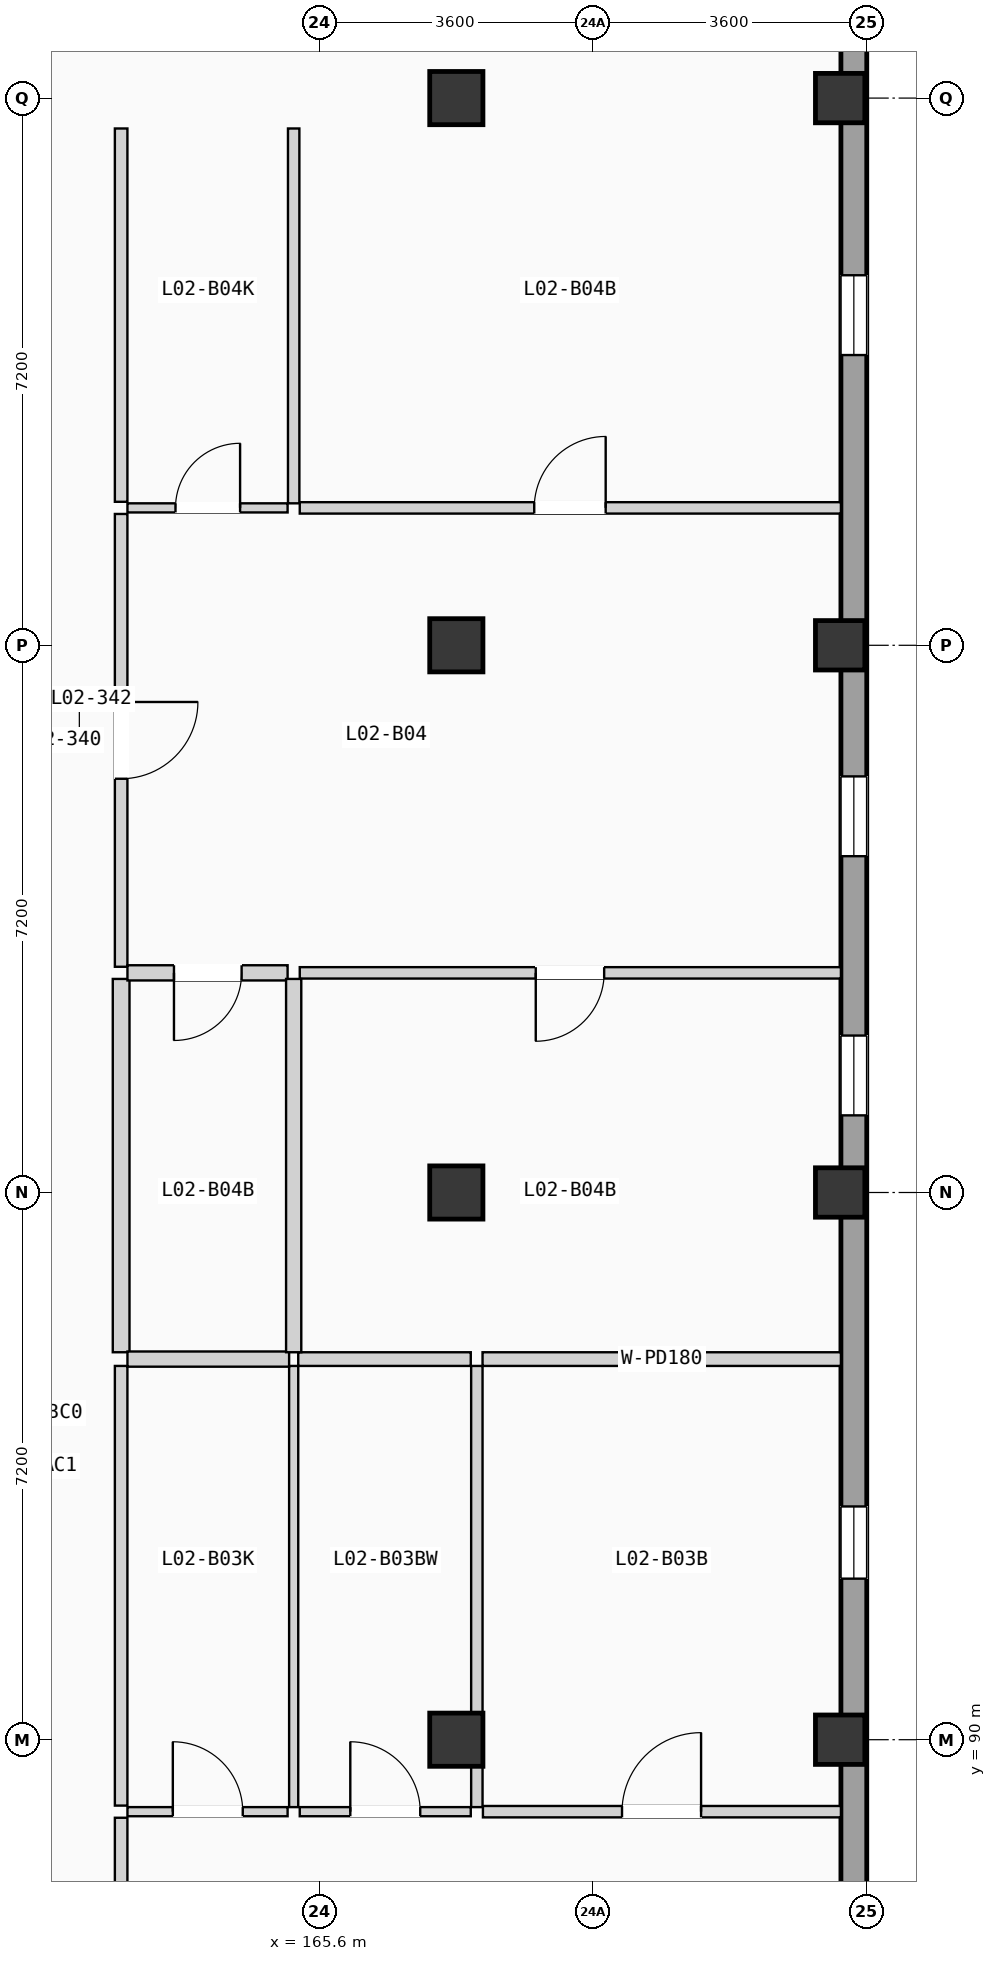
"""IFC4 building model, lengths in metres.
Left out: names, types, materials, properties, quantities, classifications, styles, units other than length and angle.
Written with IfcOpenShell. Run it as: python <this file> out.ifc"""

import sys

from ifc_helpers import new_model, si_unit, direction, frame, frame_2d, origin, origin_2d, place, context, subcontext, project, spatial, rectangle, extrude, element, fill, save


model = new_model("IFC4")
c1 = context("Model", 3, precision=1e-05, world=origin(), true_north=direction((0.0, 1.0)))
c2 = subcontext(c1, "Body", "Model", "MODEL_VIEW")
j1 = project(units=[si_unit("LENGTHUNIT", "METRE"), si_unit("PLANEANGLEUNIT", "RADIAN")], contexts=[c1])
p1 = place(None, origin())
s1 = spatial("IfcSite", under=j1, at=p1, CompositionType="ELEMENT")
p2 = place(p1, origin())
s2 = spatial("IfcBuilding", under=s1, at=p2, CompositionType="ELEMENT")
p3 = place(p2, frame((0.0, 0.0, 8.575)))
s3 = spatial("IfcBuildingStorey", under=s2, at=p3, CompositionType="ELEMENT", Elevation=8.575)
for number, where, z_axis, x_axis in (
    (1, (167.4, 90.0, 0.0), (0.0, 0.0, 1.0), (1.0, 0.0, 0.0)),
    (2, (167.4, 97.2, 0.0), (0.0, 0.0, 1.0), (1.0, 0.0, 0.0)),
    (3, (167.4, 104.4, 0.0), (0.0, 0.0, 1.0), (1.0, 0.0, 0.0)),
    (4, (167.4, 111.6, 0.0), (0.0, 0.0, 1.0), (1.0, 0.0, 0.0)),
):
    element("IfcColumn", number, at=place(p3, frame(where, z_axis=z_axis, x_axis=x_axis)), inside=s3, PredefinedType="COLUMN", context=c2, shape_type="SweptSolid", body=[
        extrude(rectangle(XDim=0.7, YDim=0.7, at=origin_2d()), origin(), (0.0, 0.0, 1.0), 3.5),
    ])
for number, where, z_axis, x_axis in (
    (5, (172.45, 90.0, 0.0), (0.0, 0.0, 1.0), (1.0, 0.0, 0.0)),
    (6, (172.45, 97.2, 0.0), (0.0, 0.0, 1.0), (1.0, 0.0, 0.0)),
    (7, (172.45, 104.4, 0.0), (0.0, 0.0, 1.0), (1.0, 0.0, 0.0)),
    (8, (172.45, 111.6, 0.0), (0.0, 0.0, 1.0), (1.0, 0.0, 0.0)),
):
    element("IfcColumn", number, at=place(p3, frame(where, z_axis=z_axis, x_axis=x_axis)), inside=s3, PredefinedType="COLUMN", context=c2, shape_type="SweptSolid", body=[
        extrude(rectangle(XDim=0.65, YDim=0.65, at=origin_2d()), origin(), (0.0, 0.0, 1.0), 3.5),
    ])
p4 = place(p3, frame((172.63, 68.74, 0.0), z_axis=(0.0, 0.0, 1.0), x_axis=(0.0, 1.0, 0.0)))
e9 = element("IfcWall", 9, at=p4, inside=s3, PredefinedType="SOLIDWALL", context=c2, shape_type="SweptSolid", body=[
    extrude(rectangle(XDim=49.72, YDim=0.34, at=frame_2d((24.86, 0.0))), origin(), (0.0, 0.0, 1.0), 3.24),
])
p5 = place(p4, frame((16.807, 0.0, 0.9)))
e10 = element("IfcOpeningElement", 10, at=p5, cuts=e9, PredefinedType="OPENING", context=c2, shape_type="SweptSolid", body=[
    extrude(rectangle(XDim=0.95, YDim=1.5, at=frame_2d((0.475, 0.75))), frame((0.0, 0.18, 0.0), z_axis=(0.0, -1.0, 0.0), x_axis=(1.0, 0.0, 0.0)), (0.0, 0.0, 1.0), 0.36),
])
p6 = place(p4, frame((9.678, 0.0, 0.9)))
e11 = element("IfcOpeningElement", 11, at=p6, cuts=e9, PredefinedType="OPENING", context=c2, shape_type="SweptSolid", body=[
    extrude(rectangle(XDim=0.95, YDim=1.65, at=frame_2d((0.475, 0.825))), frame((0.0, 0.18, 0.0), z_axis=(0.0, -1.0, 0.0), x_axis=(1.0, 0.0, 0.0)), (0.0, 0.0, 1.0), 0.36),
])
p7 = place(p4, frame((23.379, 0.0, 0.755)))
e12 = element("IfcOpeningElement", 12, at=p7, cuts=e9, PredefinedType="OPENING", context=c2, shape_type="SweptSolid", body=[
    extrude(rectangle(XDim=0.95, YDim=1.8, at=frame_2d((0.475, 0.9))), frame((0.0, 0.18, 0.0), z_axis=(0.0, -1.0, 0.0), x_axis=(1.0, 0.0, 0.0)), (0.0, 0.0, 1.0), 0.36),
])
p8 = place(p4, frame((32.885, 0.0, 0.9)))
e13 = element("IfcOpeningElement", 13, at=p8, cuts=e9, PredefinedType="OPENING", context=c2, shape_type="SweptSolid", body=[
    extrude(rectangle(XDim=1.05, YDim=1.2, at=frame_2d((0.525, 0.6))), frame((0.0, 0.18, 0.0), z_axis=(0.0, -1.0, 0.0), x_axis=(1.0, 0.0, 0.0)), (0.0, 0.0, 1.0), 0.36),
])
p9 = place(p4, frame((29.475, 0.0, 0.9)))
e14 = element("IfcOpeningElement", 14, at=p9, cuts=e9, PredefinedType="OPENING", context=c2, shape_type="SweptSolid", body=[
    extrude(rectangle(XDim=1.05, YDim=1.35, at=frame_2d((0.525, 0.675))), frame((0.0, 0.18, 0.0), z_axis=(0.0, -1.0, 0.0), x_axis=(1.0, 0.0, 0.0)), (0.0, 0.0, 1.0), 0.36),
])
p10 = place(p4, frame((39.479, 0.0, 0.9)))
e15 = element("IfcOpeningElement", 15, at=p10, cuts=e9, PredefinedType="OPENING", context=c2, shape_type="SweptSolid", body=[
    extrude(rectangle(XDim=1.05, YDim=1.5, at=frame_2d((0.525, 0.75))), frame((0.0, 0.18, 0.0), z_axis=(0.0, -1.0, 0.0), x_axis=(1.0, 0.0, 0.0)), (0.0, 0.0, 1.0), 0.36),
])
p11 = place(p3, frame((162.99, 81.945, 0.0), z_axis=(0.0, 0.0, 1.0), x_axis=(0.0, 1.0, 0.0)))
e16 = element("IfcWall", 16, at=p11, inside=s3, PredefinedType="PARTITIONING", context=c2, shape_type="SweptSolid", body=[
    extrude(rectangle(XDim=7.028, YDim=0.165, at=frame_2d((3.514, 0.0))), origin(), (0.0, 0.0, 1.0), 3.22),
])
p12 = place(p11, frame((3.009, 0.0, 0.0)))
e17 = element("IfcOpeningElement", 17, at=p12, cuts=e16, PredefinedType="OPENING", context=c2, shape_type="SweptSolid", body=[
    extrude(rectangle(XDim=1.01, YDim=2.11, at=frame_2d((0.505, 1.055))), frame((0.0, 0.093, 0.0), z_axis=(0.0, -1.0, 0.0), x_axis=(1.0, 0.0, 0.0)), (0.0, 0.0, 1.0), 0.185),
])
p13 = place(p3, frame((162.99, 89.133, 0.0), z_axis=(0.0, 0.0, 1.0), x_axis=(0.0, 1.0, 0.0)))
e18 = element("IfcWall", 18, at=p13, inside=s3, PredefinedType="PARTITIONING", context=c2, shape_type="SweptSolid", body=[
    extrude(rectangle(XDim=5.785, YDim=0.165, at=frame_2d((2.893, 0.0))), origin(), (0.0, 0.0, 1.0), 3.22),
])
p14 = place(p3, frame((162.99, 100.17, 0.0), z_axis=(0.0, 0.0, 1.0), x_axis=(0.0, 1.0, 0.0)))
e19 = element("IfcWall", 19, at=p14, inside=s3, PredefinedType="PARTITIONING", context=c2, shape_type="SweptSolid", body=[
    extrude(rectangle(XDim=5.958, YDim=0.165, at=frame_2d((2.979, 0.0))), origin(), (0.0, 0.0, 1.0), 3.22),
])
p15 = place(p14, frame((2.474, 0.0, 0.0)))
e20 = element("IfcOpeningElement", 20, at=p15, cuts=e19, PredefinedType="OPENING", context=c2, shape_type="SweptSolid", body=[
    extrude(rectangle(XDim=1.01, YDim=2.11, at=frame_2d((0.505, 1.055))), frame((0.0, 0.093, 0.0), z_axis=(0.0, -1.0, 0.0), x_axis=(1.0, 0.0, 0.0)), (0.0, 0.0, 1.0), 0.185),
])
p16 = place(p3, frame((162.99, 95.098, 0.0), z_axis=(0.0, 0.0, 1.0), x_axis=(0.0, 1.0, 0.0)))
e21 = element("IfcWall", 21, at=p16, inside=s3, PredefinedType="PLUMBINGWALL", context=c2, shape_type="SweptSolid", body=[
    extrude(rectangle(XDim=4.912, YDim=0.22, at=frame_2d((2.456, 0.0))), origin(), (0.0, 0.0, 1.0), 3.22),
])
p17 = place(p3, frame((162.99, 106.288, 0.0), z_axis=(0.0, 0.0, 1.0), x_axis=(0.0, 1.0, 0.0)))
e22 = element("IfcWall", 22, at=p17, inside=s3, PredefinedType="PARTITIONING", context=c2, shape_type="SweptSolid", body=[
    extrude(rectangle(XDim=4.912, YDim=0.165, at=frame_2d((2.456, 0.0))), origin(), (0.0, 0.0, 1.0), 3.22),
])
p18 = place(p3, frame((163.073, 89.053, 0.0), z_axis=(0.0, 0.0, 1.0), x_axis=(1.0, 0.0, 0.0)))
e23 = element("IfcWall", 23, at=p18, inside=s3, PredefinedType="PARTITIONING", context=c2, shape_type="SweptSolid", body=[
    extrude(rectangle(XDim=2.107, YDim=0.12, at=frame_2d((1.053, 0.0))), origin(), (0.0, 0.0, 1.0), 3.22),
])
p19 = place(p18, frame((0.597, 0.0, 0.0)))
e24 = element("IfcOpeningElement", 24, at=p19, cuts=e23, PredefinedType="OPENING", context=c2, shape_type="SweptSolid", body=[
    extrude(rectangle(XDim=0.92, YDim=2.02, at=frame_2d((0.46, 1.01))), frame((0.0, 0.07, 0.0), z_axis=(0.0, -1.0, 0.0), x_axis=(1.0, 0.0, 0.0)), (0.0, 0.0, 1.0), 0.14),
])
p20 = place(p3, frame((167.75, 89.053, 0.0), z_axis=(0.0, 0.0, 1.0), x_axis=(1.0, 0.0, 0.0)))
e25 = element("IfcWall", 25, at=p20, inside=s3, PredefinedType="PARTITIONING", context=c2, shape_type="SweptSolid", body=[
    extrude(rectangle(XDim=4.71, YDim=0.15, at=frame_2d((2.355, 0.0))), origin(), (0.0, 0.0, 1.0), 3.22),
])
p21 = place(p20, frame((1.83, 0.0, 0.0)))
e26 = element("IfcOpeningElement", 26, at=p21, cuts=e25, PredefinedType="OPENING", context=c2, shape_type="SweptSolid", body=[
    extrude(rectangle(XDim=1.04, YDim=2.08, at=frame_2d((0.52, 1.04))), frame((0.0, 0.085, 0.0), z_axis=(0.0, -1.0, 0.0), x_axis=(1.0, 0.0, 0.0)), (0.0, 0.0, 1.0), 0.17),
])
p22 = place(p3, frame((165.34, 89.053, 0.0), z_axis=(0.0, 0.0, 1.0), x_axis=(1.0, 0.0, 0.0)))
e27 = element("IfcWall", 27, at=p22, inside=s3, PredefinedType="PARTITIONING", context=c2, shape_type="SweptSolid", body=[
    extrude(rectangle(XDim=2.25, YDim=0.12, at=frame_2d((1.125, 0.0))), origin(), (0.0, 0.0, 1.0), 3.22),
])
p23 = place(p22, frame((0.665, 0.0, 0.0)))
e28 = element("IfcOpeningElement", 28, at=p23, cuts=e27, PredefinedType="OPENING", context=c2, shape_type="SweptSolid", body=[
    extrude(rectangle(XDim=0.92, YDim=2.02, at=frame_2d((0.46, 1.01))), frame((0.0, 0.07, 0.0), z_axis=(0.0, -1.0, 0.0), x_axis=(1.0, 0.0, 0.0)), (0.0, 0.0, 1.0), 0.14),
])
p24 = place(p3, frame((165.26, 89.113, 0.0), z_axis=(0.0, 0.0, 1.0), x_axis=(0.0, 1.0, 0.0)))
e29 = element("IfcWall", 29, at=p24, inside=s3, PredefinedType="PARTITIONING", context=c2, shape_type="SweptSolid", body=[
    extrude(rectangle(XDim=5.805, YDim=0.12, at=frame_2d((2.902, 0.0))), origin(), (0.0, 0.0, 1.0), 3.22),
])
p25 = place(p3, frame((163.073, 95.008, 0.0), z_axis=(0.0, 0.0, 1.0), x_axis=(1.0, 0.0, 0.0)))
e30 = element("IfcWall", 30, at=p25, inside=s3, PredefinedType="PLUMBINGWALL", context=c2, shape_type="SweptSolid", body=[
    extrude(rectangle(XDim=2.127, YDim=0.2, at=frame_2d((1.063, 0.0))), origin(), (0.0, 0.0, 1.0), 3.22),
])
p26 = place(p3, frame((167.67, 89.113, 0.0), z_axis=(0.0, 0.0, 1.0), x_axis=(0.0, 1.0, 0.0)))
e31 = element("IfcWall", 31, at=p26, inside=s3, PredefinedType="PARTITIONING", context=c2, shape_type="SweptSolid", body=[
    extrude(rectangle(XDim=5.805, YDim=0.15, at=frame_2d((2.902, 0.0))), origin(), (0.0, 0.0, 1.0), 3.22),
])
p27 = place(p3, frame((167.745, 95.008, 0.0), z_axis=(0.0, 0.0, 1.0), x_axis=(1.0, 0.0, 0.0)))
e32 = element("IfcWall", 32, at=p27, inside=s3, PredefinedType="PARTITIONING", context=c2, shape_type="SweptSolid", body=[
    extrude(rectangle(XDim=4.715, YDim=0.18, at=frame_2d((2.357, 0.0))), origin(), (0.0, 0.0, 1.0), 3.22),
])
p28 = place(p3, frame((165.32, 95.008, 0.0), z_axis=(0.0, 0.0, 1.0), x_axis=(1.0, 0.0, 0.0)))
e33 = element("IfcWall", 33, at=p28, inside=s3, PredefinedType="PARTITIONING", context=c2, shape_type="SweptSolid", body=[
    extrude(rectangle(XDim=2.27, YDim=0.18, at=frame_2d((1.135, 0.0))), origin(), (0.0, 0.0, 1.0), 3.22),
])
p29 = place(p3, frame((163.073, 100.09, 0.0), z_axis=(0.0, 0.0, 1.0), x_axis=(1.0, 0.0, 0.0)))
e34 = element("IfcWall", 34, at=p29, inside=s3, PredefinedType="PLUMBINGWALL", context=c2, shape_type="SweptSolid", body=[
    extrude(rectangle(XDim=2.107, YDim=0.2, at=frame_2d((1.053, 0.0))), origin(), (0.0, 0.0, 1.0), 3.22),
])
p30 = place(p29, frame((0.612, 0.0, 0.0)))
e35 = element("IfcOpeningElement", 35, at=p30, cuts=e34, PredefinedType="OPENING", context=c2, shape_type="SweptSolid", body=[
    extrude(rectangle(XDim=0.89, YDim=2.03, at=frame_2d((0.445, 1.015))), frame((0.0, 0.11, 0.0), z_axis=(0.0, -1.0, 0.0), x_axis=(1.0, 0.0, 0.0)), (0.0, 0.0, 1.0), 0.22),
])
p31 = place(p3, frame((163.073, 106.208, 0.0), z_axis=(0.0, 0.0, 1.0), x_axis=(1.0, 0.0, 0.0)))
e36 = element("IfcWall", 36, at=p31, inside=s3, PredefinedType="PARTITIONING", context=c2, shape_type="SweptSolid", body=[
    extrude(rectangle(XDim=2.107, YDim=0.12, at=frame_2d((1.053, 0.0))), origin(), (0.0, 0.0, 1.0), 3.22),
])
p32 = place(p31, frame((0.632, 0.0, 0.0)))
e37 = element("IfcOpeningElement", 37, at=p32, cuts=e36, PredefinedType="OPENING", context=c2, shape_type="SweptSolid", body=[
    extrude(rectangle(XDim=0.85, YDim=2.01, at=frame_2d((0.425, 1.005))), frame((0.0, 0.07, 0.0), z_axis=(0.0, -1.0, 0.0), x_axis=(1.0, 0.0, 0.0)), (0.0, 0.0, 1.0), 0.14),
])
p33 = place(p3, frame((165.34, 100.09, 0.0), z_axis=(0.0, 0.0, 1.0), x_axis=(1.0, 0.0, 0.0)))
e38 = element("IfcWall", 38, at=p33, inside=s3, PredefinedType="PARTITIONING", context=c2, shape_type="SweptSolid", body=[
    extrude(rectangle(XDim=7.12, YDim=0.15, at=frame_2d((3.56, 0.0))), origin(), (0.0, 0.0, 1.0), 3.22),
])
p34 = place(p33, frame((3.105, 0.0, 0.0)))
e39 = element("IfcOpeningElement", 39, at=p34, cuts=e38, PredefinedType="OPENING", context=c2, shape_type="SweptSolid", body=[
    extrude(rectangle(XDim=0.9, YDim=2.04, at=frame_2d((0.45, 1.02))), frame((0.0, 0.085, 0.0), z_axis=(0.0, -1.0, 0.0), x_axis=(1.0, 0.0, 0.0)), (0.0, 0.0, 1.0), 0.17),
])
p35 = place(p3, frame((165.34, 106.208, 0.0), z_axis=(0.0, 0.0, 1.0), x_axis=(1.0, 0.0, 0.0)))
e40 = element("IfcWall", 40, at=p35, inside=s3, PredefinedType="PARTITIONING", context=c2, shape_type="SweptSolid", body=[
    extrude(rectangle(XDim=7.12, YDim=0.15, at=frame_2d((3.56, 0.0))), origin(), (0.0, 0.0, 1.0), 3.22),
])
p36 = place(p35, frame((3.085, 0.0, 0.0)))
e41 = element("IfcOpeningElement", 41, at=p36, cuts=e40, PredefinedType="OPENING", context=c2, shape_type="SweptSolid", body=[
    extrude(rectangle(XDim=0.94, YDim=2.06, at=frame_2d((0.47, 1.03))), frame((0.0, 0.085, 0.0), z_axis=(0.0, -1.0, 0.0), x_axis=(1.0, 0.0, 0.0)), (0.0, 0.0, 1.0), 0.17),
])
p37 = place(p3, frame((165.26, 95.098, 0.0), z_axis=(0.0, 0.0, 1.0), x_axis=(0.0, 1.0, 0.0)))
e42 = element("IfcWall", 42, at=p37, inside=s3, PredefinedType="PLUMBINGWALL", context=c2, shape_type="SweptSolid", body=[
    extrude(rectangle(XDim=4.912, YDim=0.2, at=frame_2d((2.456, 0.0))), origin(), (0.0, 0.0, 1.0), 3.22),
])
p38 = place(p3, frame((165.26, 106.268, 0.0), z_axis=(0.0, 0.0, 1.0), x_axis=(0.0, 1.0, 0.0)))
e43 = element("IfcWall", 43, at=p38, inside=s3, PredefinedType="PARTITIONING", context=c2, shape_type="SweptSolid", body=[
    extrude(rectangle(XDim=4.932, YDim=0.15, at=frame_2d((2.466, 0.0))), origin(), (0.0, 0.0, 1.0), 3.22),
])
p39 = place(p7, origin())
e44 = element("IfcWindow", 44, at=p39, inside=s3, PartitioningType="SINGLE_PANEL", PredefinedType="WINDOW", context=c2, shape_type="SweptSolid", body=[
    extrude(rectangle(XDim=0.95, YDim=1.8, at=frame_2d((0.475, 0.9))), frame((0.0, 0.03, 0.0), z_axis=(0.0, -1.0, 0.0), x_axis=(1.0, 0.0, 0.0)), (0.0, 0.0, 1.0), 0.06),
])
fill(e12, e44)
p40 = place(p8, origin())
e45 = element("IfcWindow", 45, at=p40, inside=s3, PartitioningType="SINGLE_PANEL", PredefinedType="WINDOW", context=c2, shape_type="SweptSolid", body=[
    extrude(rectangle(XDim=1.05, YDim=1.2, at=frame_2d((0.525, 0.6))), frame((0.0, 0.03, 0.0), z_axis=(0.0, -1.0, 0.0), x_axis=(1.0, 0.0, 0.0)), (0.0, 0.0, 1.0), 0.06),
])
fill(e13, e45)
p41 = place(p9, origin())
e46 = element("IfcWindow", 46, at=p41, inside=s3, PartitioningType="SINGLE_PANEL", PredefinedType="WINDOW", context=c2, shape_type="SweptSolid", body=[
    extrude(rectangle(XDim=1.05, YDim=1.35, at=frame_2d((0.525, 0.675))), frame((0.0, 0.03, 0.0), z_axis=(0.0, -1.0, 0.0), x_axis=(1.0, 0.0, 0.0)), (0.0, 0.0, 1.0), 0.06),
])
fill(e14, e46)
p42 = place(p10, origin())
e47 = element("IfcWindow", 47, at=p42, inside=s3, PartitioningType="SINGLE_PANEL", PredefinedType="WINDOW", context=c2, shape_type="SweptSolid", body=[
    extrude(rectangle(XDim=1.05, YDim=1.5, at=frame_2d((0.525, 0.75))), frame((0.0, 0.03, 0.0), z_axis=(0.0, -1.0, 0.0), x_axis=(1.0, 0.0, 0.0)), (0.0, 0.0, 1.0), 0.06),
])
fill(e15, e47)
p43 = place(p15, frame((1.01, 0.0, 0.0), z_axis=(0.0, 0.0, 1.0), x_axis=(-1.0, 0.0, 0.0)))
e48 = element("IfcDoor", 48, at=p43, inside=s3, OperationType="SINGLE_SWING_RIGHT", PredefinedType="DOOR", context=c2, shape_type="SweptSolid", body=[
    extrude(rectangle(XDim=1.01, YDim=2.11, at=frame_2d((0.505, 1.055))), frame((0.0, 0.025, 0.0), z_axis=(0.0, -1.0, 0.0), x_axis=(1.0, 0.0, 0.0)), (0.0, 0.0, 1.0), 0.05),
])
fill(e20, e48)
p44 = place(p19, origin())
e49 = element("IfcDoor", 49, at=p44, inside=s3, OperationType="SINGLE_SWING_LEFT", PredefinedType="DOOR", context=c2, shape_type="SweptSolid", body=[
    extrude(rectangle(XDim=0.92, YDim=2.02, at=frame_2d((0.46, 1.01))), frame((0.0, 0.025, 0.0), z_axis=(0.0, -1.0, 0.0), x_axis=(1.0, 0.0, 0.0)), (0.0, 0.0, 1.0), 0.05),
])
fill(e24, e49)
p45 = place(p21, origin())
e50 = element("IfcDoor", 50, at=p45, inside=s3, OperationType="SINGLE_SWING_RIGHT", PredefinedType="DOOR", context=c2, shape_type="SweptSolid", body=[
    extrude(rectangle(XDim=1.04, YDim=2.08, at=frame_2d((0.52, 1.04))), frame((0.0, 0.025, 0.0), z_axis=(0.0, -1.0, 0.0), x_axis=(1.0, 0.0, 0.0)), (0.0, 0.0, 1.0), 0.05),
])
fill(e26, e50)
p46 = place(p23, origin())
e51 = element("IfcDoor", 51, at=p46, inside=s3, OperationType="SINGLE_SWING_LEFT", PredefinedType="DOOR", context=c2, shape_type="SweptSolid", body=[
    extrude(rectangle(XDim=0.92, YDim=2.02, at=frame_2d((0.46, 1.01))), frame((0.0, 0.025, 0.0), z_axis=(0.0, -1.0, 0.0), x_axis=(1.0, 0.0, 0.0)), (0.0, 0.0, 1.0), 0.05),
])
fill(e28, e51)
p47 = place(p30, frame((0.89, 0.0, 0.0), z_axis=(0.0, 0.0, 1.0), x_axis=(-1.0, 0.0, 0.0)))
e52 = element("IfcDoor", 52, at=p47, inside=s3, OperationType="SINGLE_SWING_LEFT", PredefinedType="DOOR", context=c2, shape_type="SweptSolid", body=[
    extrude(rectangle(XDim=0.89, YDim=2.03, at=frame_2d((0.445, 1.015))), frame((0.0, 0.025, 0.0), z_axis=(0.0, -1.0, 0.0), x_axis=(1.0, 0.0, 0.0)), (0.0, 0.0, 1.0), 0.05),
])
fill(e35, e52)
p48 = place(p32, origin())
e53 = element("IfcDoor", 53, at=p48, inside=s3, OperationType="SINGLE_SWING_RIGHT", PredefinedType="DOOR", context=c2, shape_type="SweptSolid", body=[
    extrude(rectangle(XDim=0.85, YDim=2.01, at=frame_2d((0.425, 1.005))), frame((0.0, 0.025, 0.0), z_axis=(0.0, -1.0, 0.0), x_axis=(1.0, 0.0, 0.0)), (0.0, 0.0, 1.0), 0.05),
])
fill(e37, e53)
p49 = place(p34, frame((0.9, 0.0, 0.0), z_axis=(0.0, 0.0, 1.0), x_axis=(-1.0, 0.0, 0.0)))
e54 = element("IfcDoor", 54, at=p49, inside=s3, OperationType="SINGLE_SWING_LEFT", PredefinedType="DOOR", context=c2, shape_type="SweptSolid", body=[
    extrude(rectangle(XDim=0.9, YDim=2.04, at=frame_2d((0.45, 1.02))), frame((0.0, 0.025, 0.0), z_axis=(0.0, -1.0, 0.0), x_axis=(1.0, 0.0, 0.0)), (0.0, 0.0, 1.0), 0.05),
])
fill(e39, e54)
p50 = place(p36, origin())
e55 = element("IfcDoor", 55, at=p50, inside=s3, OperationType="SINGLE_SWING_RIGHT", PredefinedType="DOOR", context=c2, shape_type="SweptSolid", body=[
    extrude(rectangle(XDim=0.94, YDim=2.06, at=frame_2d((0.47, 1.03))), frame((0.0, 0.025, 0.0), z_axis=(0.0, -1.0, 0.0), x_axis=(1.0, 0.0, 0.0)), (0.0, 0.0, 1.0), 0.05),
])
fill(e41, e55)
save(model, sys.argv[1])
